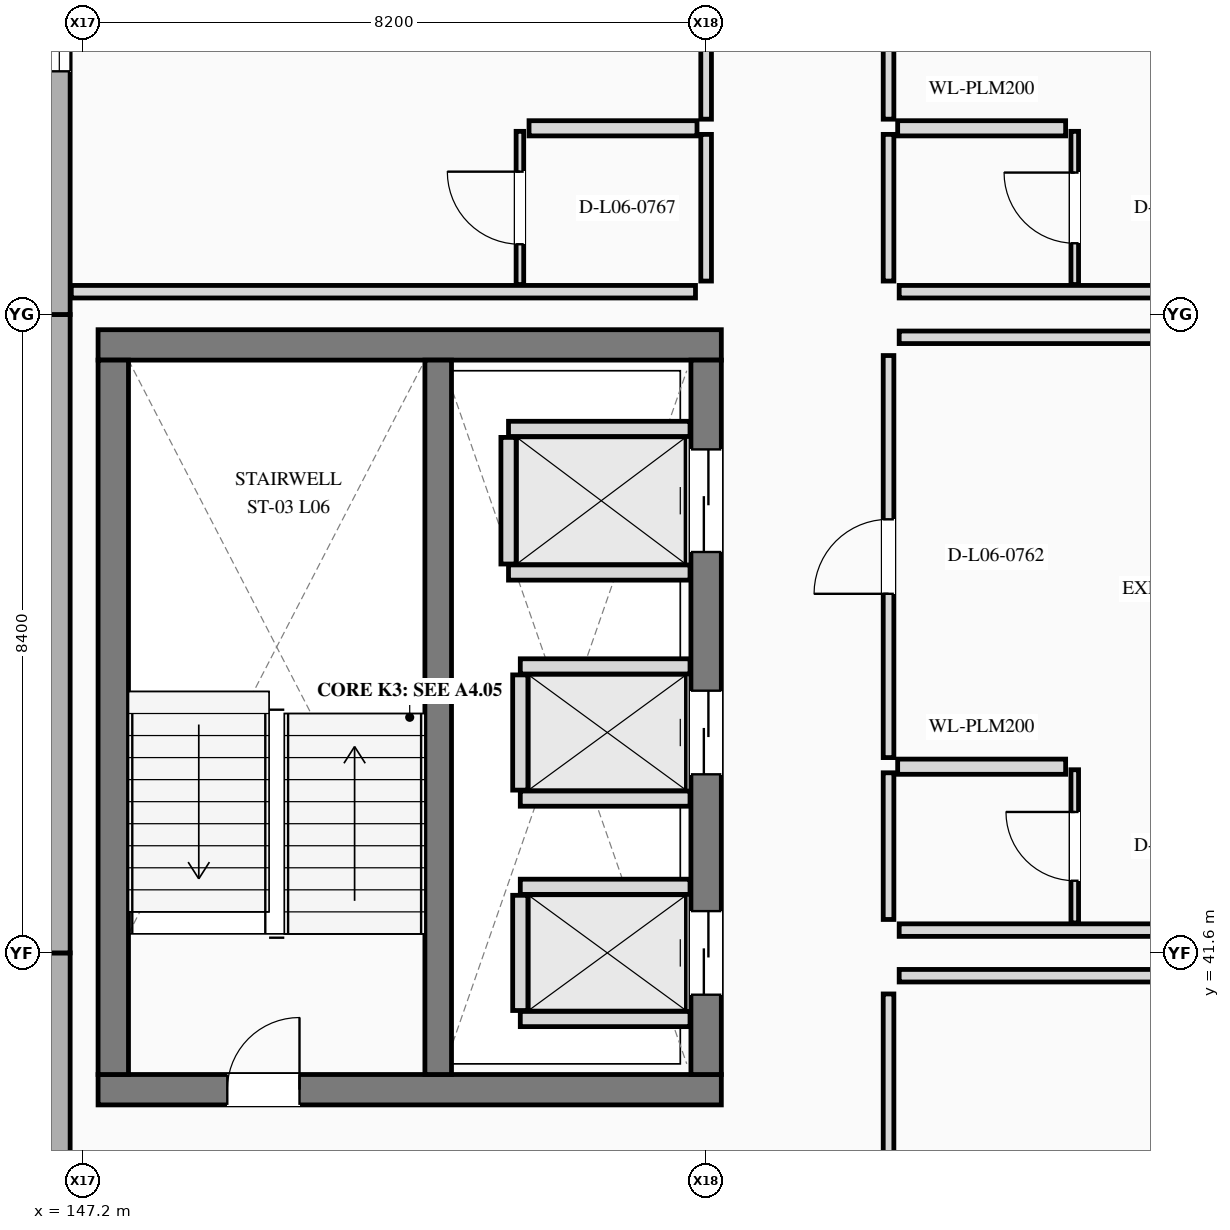
"""IFC4 building model, lengths in metres.
Left out: names, types, materials, properties, quantities, classifications, styles, units other than length and angle.
Written with IfcOpenShell. Run it as: python <this file> out.ifc"""

import sys

from ifc_helpers import new_model, si_unit, direction, frame, frame_2d, origin, place, context, subcontext, project, spatial, rectangle, extrude, element, fill, save


model = new_model("IFC4")
c1 = context("Model", 3, precision=1e-05, world=origin(), true_north=direction((0.0, 1.0)))
c2 = subcontext(c1, "Body", "Model", "MODEL_VIEW")
j1 = project(units=[si_unit("LENGTHUNIT", "METRE"), si_unit("PLANEANGLEUNIT", "RADIAN")], contexts=[c1])
p1 = place(None, origin())
s1 = spatial("IfcSite", under=j1, at=p1, CompositionType="ELEMENT")
p2 = place(p1, origin())
s2 = spatial("IfcBuilding", under=s1, at=p2, CompositionType="ELEMENT")
p3 = place(p2, frame((0.0, 0.0, 27.0)))
s3 = spatial("IfcBuildingStorey", under=s2, at=p3, CompositionType="ELEMENT", Elevation=27.0)
p4 = place(p3, frame((146.89, 33.2, 0.0), z_axis=(0.0, 0.0, 1.0), x_axis=(0.0, 1.0, 0.0)))
e1 = element("IfcWall", 1, at=p4, inside=s3, PredefinedType="STANDARD", context=c2, shape_type="SweptSolid", body=[
    extrude(rectangle(XDim=8.4, YDim=0.285, at=frame_2d((4.2, 0.0))), origin(), (0.0, 0.0, 1.0), 3.6),
])
p5 = place(p3, frame((146.89, 41.6, 0.0), z_axis=(0.0, 0.0, 1.0), x_axis=(0.0, 1.0, 0.0)))
e2 = element("IfcWall", 2, at=p5, inside=s3, PredefinedType="STANDARD", context=c2, shape_type="SweptSolid", body=[
    extrude(rectangle(XDim=8.4, YDim=0.285, at=frame_2d((4.2, 0.0))), origin(), (0.0, 0.0, 1.0), 3.6),
])
p6 = place(p3, frame((146.89, 50.0, 0.0), z_axis=(0.0, 0.0, 1.0), x_axis=(0.0, 1.0, 0.0)))
e3 = element("IfcWall", 3, at=p6, inside=s3, PredefinedType="STANDARD", context=c2, shape_type="SweptSolid", body=[
    extrude(rectangle(XDim=8.4, YDim=0.285, at=frame_2d((4.2, 0.0))), origin(), (0.0, 0.0, 1.0), 3.6),
])
p7 = place(p6, frame((3.2, 0.0, 0.85)))
e4 = element("IfcOpeningElement", 4, at=p7, cuts=e3, PredefinedType="OPENING", context=c2, shape_type="SweptSolid", body=[
    extrude(rectangle(XDim=2.0, YDim=1.65, at=frame_2d((1.0, 0.825))), frame((0.0, 0.152, 0.0), z_axis=(0.0, -1.0, 0.0), x_axis=(1.0, 0.0, 0.0)), (0.0, 0.0, 1.0), 0.305),
])
p8 = place(p3, frame((147.4, 39.8, 0.0), z_axis=(0.0, 0.0, 1.0), x_axis=(1.0, 0.0, 0.0)))
e5 = element("IfcWall", 5, at=p8, inside=s3, PredefinedType="SHEAR", context=c2, shape_type="SweptSolid", body=[
    extrude(rectangle(XDim=8.2, YDim=0.4, at=frame_2d((4.1, 0.0))), origin(), (0.0, 0.0, 1.0), 3.6),
])
p9 = place(p8, frame((1.7, 0.0, 0.0)))
e6 = element("IfcOpeningElement", 6, at=p9, cuts=e5, PredefinedType="OPENING", context=c2, shape_type="SweptSolid", body=[
    extrude(rectangle(XDim=0.95, YDim=2.2, at=frame_2d((0.475, 1.1))), frame((0.0, 0.21, 0.0), z_axis=(0.0, -1.0, 0.0), x_axis=(1.0, 0.0, 0.0)), (0.0, 0.0, 1.0), 0.42),
])
p10 = place(p3, frame((155.6, 49.6, 0.0), z_axis=(0.0, 0.0, 1.0), x_axis=(-1.0, 0.0, 0.0)))
e7 = element("IfcWall", 7, at=p10, inside=s3, PredefinedType="SHEAR", context=c2, shape_type="SweptSolid", body=[
    extrude(rectangle(XDim=8.2, YDim=0.4, at=frame_2d((4.1, 0.0))), origin(), (0.0, 0.0, 1.0), 3.6),
])
p11 = place(p3, frame((147.6, 49.4, 0.0), z_axis=(0.0, 0.0, 1.0), x_axis=(0.0, -1.0, 0.0)))
e8 = element("IfcWall", 8, at=p11, inside=s3, PredefinedType="SHEAR", context=c2, shape_type="SweptSolid", body=[
    extrude(rectangle(XDim=9.4, YDim=0.4, at=frame_2d((4.7, 0.0))), origin(), (0.0, 0.0, 1.0), 3.6),
])
p12 = place(p3, frame((155.4, 40.0, 0.0), z_axis=(0.0, 0.0, 1.0), x_axis=(0.0, 1.0, 0.0)))
e9 = element("IfcWall", 9, at=p12, inside=s3, PredefinedType="SHEAR", context=c2, shape_type="SweptSolid", body=[
    extrude(rectangle(XDim=9.4, YDim=0.4, at=frame_2d((4.7, 0.0))), origin(), (0.0, 0.0, 1.0), 3.6),
])
p13 = place(p12, frame((1.05, 0.0, 0.0)))
e10 = element("IfcOpeningElement", 10, at=p13, cuts=e9, PredefinedType="OPENING", context=c2, shape_type="SweptSolid", body=[
    extrude(rectangle(XDim=1.1, YDim=2.2, at=frame_2d((0.55, 1.1))), frame((0.0, 0.21, 0.0), z_axis=(0.0, -1.0, 0.0), x_axis=(1.0, 0.0, 0.0)), (0.0, 0.0, 1.0), 0.42),
])
p14 = place(p12, frame((3.95, 0.0, 0.0)))
e11 = element("IfcOpeningElement", 11, at=p14, cuts=e9, PredefinedType="OPENING", context=c2, shape_type="SweptSolid", body=[
    extrude(rectangle(XDim=1.1, YDim=2.2, at=frame_2d((0.55, 1.1))), frame((0.0, 0.21, 0.0), z_axis=(0.0, -1.0, 0.0), x_axis=(1.0, 0.0, 0.0)), (0.0, 0.0, 1.0), 0.42),
])
p15 = place(p12, frame((6.875, 0.0, 0.0)))
e12 = element("IfcOpeningElement", 12, at=p15, cuts=e9, PredefinedType="OPENING", context=c2, shape_type="SweptSolid", body=[
    extrude(rectangle(XDim=1.35, YDim=2.3, at=frame_2d((0.675, 1.15))), frame((0.0, 0.21, 0.0), z_axis=(0.0, -1.0, 0.0), x_axis=(1.0, 0.0, 0.0)), (0.0, 0.0, 1.0), 0.42),
])
p16 = place(p3, frame((151.875, 40.0, 0.0), z_axis=(0.0, 0.0, 1.0), x_axis=(0.0, 1.0, 0.0)))
e13 = element("IfcWall", 13, at=p16, inside=s3, PredefinedType="SHEAR", context=c2, shape_type="SweptSolid", body=[
    extrude(rectangle(XDim=9.4, YDim=0.35, at=frame_2d((4.7, 0.0))), origin(), (0.0, 0.0, 1.0), 3.6),
])
for number, where, z_axis, x_axis in (
    (14, (152.955, 40.73, 0.0), (0.0, 0.0, 1.0), (1.0, 0.0, 0.0)),
    (15, (152.955, 42.47, 0.0), (0.0, 0.0, 1.0), (1.0, 0.0, 0.0)),
):
    element("IfcWall", number, at=place(p3, frame(where, z_axis=z_axis, x_axis=x_axis)), inside=s3, PredefinedType="PLUMBINGWALL", context=c2, shape_type="SweptSolid", body=[
        extrude(rectangle(XDim=2.233, YDim=0.2, at=frame_2d((1.116, 0.0))), origin(), (0.0, 0.0, 1.0), 3.29),
    ])
p17 = place(p3, frame((152.955, 40.842, 0.0), z_axis=(0.0, 0.0, 1.0), x_axis=(0.0, 1.0, 0.0)))
e16 = element("IfcWall", 16, at=p17, inside=s3, PredefinedType="PLUMBINGWALL", context=c2, shape_type="SweptSolid", body=[
    extrude(rectangle(XDim=1.516, YDim=0.2, at=frame_2d((0.758, 0.0))), origin(), (0.0, 0.0, 1.0), 3.29),
])
for number, where, z_axis, x_axis in (
    (17, (152.955, 43.63, 0.0), (0.0, 0.0, 1.0), (1.0, 0.0, 0.0)),
    (18, (152.955, 45.37, 0.0), (0.0, 0.0, 1.0), (1.0, 0.0, 0.0)),
):
    element("IfcWall", number, at=place(p3, frame(where, z_axis=z_axis, x_axis=x_axis)), inside=s3, PredefinedType="PLUMBINGWALL", context=c2, shape_type="SweptSolid", body=[
        extrude(rectangle(XDim=2.233, YDim=0.2, at=frame_2d((1.116, 0.0))), origin(), (0.0, 0.0, 1.0), 3.29),
    ])
p18 = place(p3, frame((152.955, 43.742, 0.0), z_axis=(0.0, 0.0, 1.0), x_axis=(0.0, 1.0, 0.0)))
e19 = element("IfcWall", 19, at=p18, inside=s3, PredefinedType="PLUMBINGWALL", context=c2, shape_type="SweptSolid", body=[
    extrude(rectangle(XDim=1.516, YDim=0.2, at=frame_2d((0.758, 0.0))), origin(), (0.0, 0.0, 1.0), 3.29),
])
for number, where, z_axis, x_axis in (
    (20, (152.8, 46.605, 0.0), (0.0, 0.0, 1.0), (1.0, 0.0, 0.0)),
    (21, (152.8, 48.495, 0.0), (0.0, 0.0, 1.0), (1.0, 0.0, 0.0)),
):
    element("IfcWall", number, at=place(p3, frame(where, z_axis=z_axis, x_axis=x_axis)), inside=s3, PredefinedType="PLUMBINGWALL", context=c2, shape_type="SweptSolid", body=[
        extrude(rectangle(XDim=2.388, YDim=0.2, at=frame_2d((1.194, 0.0))), origin(), (0.0, 0.0, 1.0), 3.29),
    ])
p19 = place(p3, frame((152.8, 46.717, 0.0), z_axis=(0.0, 0.0, 1.0), x_axis=(0.0, 1.0, 0.0)))
e22 = element("IfcWall", 22, at=p19, inside=s3, PredefinedType="PLUMBINGWALL", context=c2, shape_type="SweptSolid", body=[
    extrude(rectangle(XDim=1.666, YDim=0.2, at=frame_2d((0.833, 0.0))), origin(), (0.0, 0.0, 1.0), 3.29),
])
p20 = place(p3, frame((157.8, 35.77, 0.0), z_axis=(0.0, 0.0, 1.0), x_axis=(0.0, 1.0, 0.0)))
e23 = element("IfcWall", 23, at=p20, inside=s3, PredefinedType="PARTITIONING", context=c2, shape_type="SweptSolid", body=[
    extrude(rectangle(XDim=5.29, YDim=0.14, at=frame_2d((2.645, 0.0))), origin(), (0.0, 0.0, 1.0), 2.843),
])
p21 = place(p20, frame((2.185, 0.0, 0.0)))
e24 = element("IfcOpeningElement", 24, at=p21, cuts=e23, PredefinedType="OPENING", context=c2, shape_type="SweptSolid", body=[
    extrude(rectangle(XDim=0.92, YDim=2.3, at=frame_2d((0.46, 1.15))), frame((0.0, 0.08, 0.0), z_axis=(0.0, -1.0, 0.0), x_axis=(1.0, 0.0, 0.0)), (0.0, 0.0, 1.0), 0.16),
])
p22 = place(p3, frame((157.94, 41.3, 0.0), z_axis=(0.0, 0.0, 1.0), x_axis=(1.0, 0.0, 0.0)))
e25 = element("IfcWall", 25, at=p22, inside=s3, PredefinedType="PARTITIONING", context=c2, shape_type="SweptSolid", body=[
    extrude(rectangle(XDim=8.213, YDim=0.165, at=frame_2d((4.106, 0.0))), origin(), (0.0, 0.0, 1.0), 2.68),
])
p23 = place(p3, frame((157.8, 42.04, 0.0), z_axis=(0.0, 0.0, 1.0), x_axis=(0.0, 1.0, 0.0)))
e26 = element("IfcWall", 26, at=p23, inside=s3, PredefinedType="PARTITIONING", context=c2, shape_type="SweptSolid", body=[
    extrude(rectangle(XDim=1.93, YDim=0.14, at=frame_2d((0.965, 0.0))), origin(), (0.0, 0.0, 1.0), 3.29),
])
p24 = place(p3, frame((157.8, 44.17, 0.0), z_axis=(0.0, 0.0, 1.0), x_axis=(0.0, 1.0, 0.0)))
e27 = element("IfcWall", 27, at=p24, inside=s3, PredefinedType="PARTITIONING", context=c2, shape_type="SweptSolid", body=[
    extrude(rectangle(XDim=5.29, YDim=0.14, at=frame_2d((2.645, 0.0))), origin(), (0.0, 0.0, 1.0), 3.29),
])
p25 = place(p24, frame((2.155, 0.0, 0.0)))
e28 = element("IfcOpeningElement", 28, at=p25, cuts=e27, PredefinedType="OPENING", context=c2, shape_type="SweptSolid", body=[
    extrude(rectangle(XDim=0.98, YDim=2.35, at=frame_2d((0.49, 1.175))), frame((0.0, 0.08, 0.0), z_axis=(0.0, -1.0, 0.0), x_axis=(1.0, 0.0, 0.0)), (0.0, 0.0, 1.0), 0.16),
])
for number, where, z_axis, x_axis in (
    (29, (157.94, 41.9, 0.0), (0.0, 0.0, 1.0), (1.0, 0.0, 0.0)),
    (30, (157.94, 49.7, 0.0), (0.0, 0.0, 1.0), (1.0, 0.0, 0.0)),
):
    element("IfcWall", number, at=place(p3, frame(where, z_axis=z_axis, x_axis=x_axis)), inside=s3, PredefinedType="PARTITIONING", context=c2, shape_type="SweptSolid", body=[
        extrude(rectangle(XDim=8.213, YDim=0.165, at=frame_2d((4.106, 0.0))), origin(), (0.0, 0.0, 1.0), 2.68),
    ])
p26 = place(p3, frame((157.92, 44.05, 0.0), z_axis=(0.0, 0.0, 1.0), x_axis=(1.0, 0.0, 0.0)))
e31 = element("IfcWall", 31, at=p26, inside=s3, PredefinedType="PLUMBINGWALL", context=c2, shape_type="SweptSolid", body=[
    extrude(rectangle(XDim=2.21, YDim=0.2, at=frame_2d((1.105, 0.0))), origin(), (0.0, 0.0, 1.0), 3.29),
])
p27 = place(p3, frame((160.25, 41.994, 0.0), z_axis=(0.0, 0.0, 1.0), x_axis=(0.0, 1.0, 0.0)))
e32 = element("IfcWall", 32, at=p27, inside=s3, PredefinedType="PARTITIONING", context=c2, shape_type="SweptSolid", body=[
    extrude(rectangle(XDim=2.016, YDim=0.1, at=frame_2d((1.008, 0.0))), origin(), (0.0, 0.0, 1.0), 3.29),
])
p28 = place(p27, frame((0.555, 0.0, 0.0)))
e33 = element("IfcOpeningElement", 33, at=p28, cuts=e32, PredefinedType="OPENING", context=c2, shape_type="SweptSolid", body=[
    extrude(rectangle(XDim=0.905, YDim=2.1, at=frame_2d((0.453, 1.05))), frame((0.0, 0.06, 0.0), z_axis=(0.0, -1.0, 0.0), x_axis=(1.0, 0.0, 0.0)), (0.0, 0.0, 1.0), 0.12),
])
p29 = place(p3, frame((157.8, 50.44, 0.0), z_axis=(0.0, 0.0, 1.0), x_axis=(0.0, 1.0, 0.0)))
e34 = element("IfcWall", 34, at=p29, inside=s3, PredefinedType="PARTITIONING", context=c2, shape_type="SweptSolid", body=[
    extrude(rectangle(XDim=1.93, YDim=0.14, at=frame_2d((0.965, 0.0))), origin(), (0.0, 0.0, 1.0), 2.843),
])
p30 = place(p3, frame((157.8, 52.57, 0.0), z_axis=(0.0, 0.0, 1.0), x_axis=(0.0, 1.0, 0.0)))
e35 = element("IfcWall", 35, at=p30, inside=s3, PredefinedType="PARTITIONING", context=c2, shape_type="SweptSolid", body=[
    extrude(rectangle(XDim=5.29, YDim=0.14, at=frame_2d((2.645, 0.0))), origin(), (0.0, 0.0, 1.0), 2.843),
])
p31 = place(p30, frame((2.14, 0.0, 0.0)))
e36 = element("IfcOpeningElement", 36, at=p31, cuts=e35, PredefinedType="OPENING", context=c2, shape_type="SweptSolid", body=[
    extrude(rectangle(XDim=1.01, YDim=2.35, at=frame_2d((0.505, 1.175))), frame((0.0, 0.08, 0.0), z_axis=(0.0, -1.0, 0.0), x_axis=(1.0, 0.0, 0.0)), (0.0, 0.0, 1.0), 0.16),
])
p32 = place(p3, frame((157.94, 50.3, 0.0), z_axis=(0.0, 0.0, 1.0), x_axis=(1.0, 0.0, 0.0)))
e37 = element("IfcWall", 37, at=p32, inside=s3, PredefinedType="PARTITIONING", context=c2, shape_type="SweptSolid", body=[
    extrude(rectangle(XDim=8.213, YDim=0.165, at=frame_2d((4.106, 0.0))), origin(), (0.0, 0.0, 1.0), 2.68),
])
p33 = place(p3, frame((157.92, 52.45, 0.0), z_axis=(0.0, 0.0, 1.0), x_axis=(1.0, 0.0, 0.0)))
e38 = element("IfcWall", 38, at=p33, inside=s3, PredefinedType="PLUMBINGWALL", context=c2, shape_type="SweptSolid", body=[
    extrude(rectangle(XDim=2.21, YDim=0.2, at=frame_2d((1.105, 0.0))), origin(), (0.0, 0.0, 1.0), 3.29),
])
p34 = place(p3, frame((160.25, 50.395, 0.0), z_axis=(0.0, 0.0, 1.0), x_axis=(0.0, 1.0, 0.0)))
e39 = element("IfcWall", 39, at=p34, inside=s3, PredefinedType="PARTITIONING", context=c2, shape_type="SweptSolid", body=[
    extrude(rectangle(XDim=2.015, YDim=0.1, at=frame_2d((1.008, 0.0))), origin(), (0.0, 0.0, 1.0), 2.843),
])
p35 = place(p34, frame((0.543, 0.0, 0.0)))
e40 = element("IfcOpeningElement", 40, at=p35, cuts=e39, PredefinedType="OPENING", context=c2, shape_type="SweptSolid", body=[
    extrude(rectangle(XDim=0.93, YDim=2.14, at=frame_2d((0.465, 1.07))), frame((0.0, 0.06, 0.0), z_axis=(0.0, -1.0, 0.0), x_axis=(1.0, 0.0, 0.0)), (0.0, 0.0, 1.0), 0.12),
])
p36 = place(p3, frame((155.4, 50.44, 0.0), z_axis=(0.0, 0.0, 1.0), x_axis=(0.0, 1.0, 0.0)))
e41 = element("IfcWall", 41, at=p36, inside=s3, PredefinedType="PARTITIONING", context=c2, shape_type="SweptSolid", body=[
    extrude(rectangle(XDim=1.93, YDim=0.14, at=frame_2d((0.965, 0.0))), origin(), (0.0, 0.0, 1.0), 2.68),
])
p37 = place(p3, frame((155.4, 52.57, 0.0), z_axis=(0.0, 0.0, 1.0), x_axis=(0.0, 1.0, 0.0)))
e42 = element("IfcWall", 42, at=p37, inside=s3, PredefinedType="PARTITIONING", context=c2, shape_type="SweptSolid", body=[
    extrude(rectangle(XDim=5.29, YDim=0.14, at=frame_2d((2.645, 0.0))), origin(), (0.0, 0.0, 1.0), 2.68),
])
p38 = place(p37, frame((2.125, 0.0, 0.0)))
e43 = element("IfcOpeningElement", 43, at=p38, cuts=e42, PredefinedType="OPENING", context=c2, shape_type="SweptSolid", body=[
    extrude(rectangle(XDim=1.04, YDim=2.4, at=frame_2d((0.52, 1.2))), frame((0.0, 0.08, 0.0), z_axis=(0.0, -1.0, 0.0), x_axis=(1.0, 0.0, 0.0)), (0.0, 0.0, 1.0), 0.16),
])
p39 = place(p3, frame((147.048, 50.3, 0.0), z_axis=(0.0, 0.0, 1.0), x_axis=(1.0, 0.0, 0.0)))
e44 = element("IfcWall", 44, at=p39, inside=s3, PredefinedType="PARTITIONING", context=c2, shape_type="SweptSolid", body=[
    extrude(rectangle(XDim=8.212, YDim=0.165, at=frame_2d((4.106, 0.0))), origin(), (0.0, 0.0, 1.0), 3.29),
])
p40 = place(p3, frame((153.07, 52.45, 0.0), z_axis=(0.0, 0.0, 1.0), x_axis=(1.0, 0.0, 0.0)))
e45 = element("IfcWall", 45, at=p40, inside=s3, PredefinedType="PLUMBINGWALL", context=c2, shape_type="SweptSolid", body=[
    extrude(rectangle(XDim=2.21, YDim=0.2, at=frame_2d((1.105, 0.0))), origin(), (0.0, 0.0, 1.0), 3.29),
])
p41 = place(p3, frame((152.95, 50.395, 0.0), z_axis=(0.0, 0.0, 1.0), x_axis=(0.0, 1.0, 0.0)))
e46 = element("IfcWall", 46, at=p41, inside=s3, PredefinedType="PARTITIONING", context=c2, shape_type="SweptSolid", body=[
    extrude(rectangle(XDim=2.015, YDim=0.1, at=frame_2d((1.008, 0.0))), origin(), (0.0, 0.0, 1.0), 3.29),
])
p42 = place(p41, frame((0.53, 0.0, 0.0)))
e47 = element("IfcOpeningElement", 47, at=p42, cuts=e46, PredefinedType="OPENING", context=c2, shape_type="SweptSolid", body=[
    extrude(rectangle(XDim=0.955, YDim=2.14, at=frame_2d((0.478, 1.07))), frame((0.0, 0.06, 0.0), z_axis=(0.0, -1.0, 0.0), x_axis=(1.0, 0.0, 0.0)), (0.0, 0.0, 1.0), 0.12),
])
p43 = place(p7, origin())
e48 = element("IfcWindow", 48, at=p43, inside=s3, PartitioningType="SINGLE_PANEL", PredefinedType="WINDOW", context=c2, shape_type="SweptSolid", body=[
    extrude(rectangle(XDim=2.0, YDim=1.65, at=frame_2d((1.0, 0.825))), frame((0.0, 0.03, 0.0), z_axis=(0.0, -1.0, 0.0), x_axis=(1.0, 0.0, 0.0)), (0.0, 0.0, 1.0), 0.06),
])
fill(e4, e48)
p44 = place(p9, origin())
e49 = element("IfcDoor", 49, at=p44, inside=s3, OperationType="SINGLE_SWING_RIGHT", PredefinedType="DOOR", context=c2, shape_type="SweptSolid", body=[
    extrude(rectangle(XDim=0.95, YDim=2.2, at=frame_2d((0.475, 1.1))), frame((0.0, 0.025, 0.0), z_axis=(0.0, -1.0, 0.0), x_axis=(1.0, 0.0, 0.0)), (0.0, 0.0, 1.0), 0.05),
])
fill(e6, e49)
p45 = place(p13, origin())
e50 = element("IfcDoor", 50, at=p45, inside=s3, OperationType="SLIDING_TO_LEFT", PredefinedType="DOOR", context=c2, shape_type="SweptSolid", body=[
    extrude(rectangle(XDim=1.1, YDim=2.2, at=frame_2d((0.55, 1.1))), frame((0.0, 0.025, 0.0), z_axis=(0.0, -1.0, 0.0), x_axis=(1.0, 0.0, 0.0)), (0.0, 0.0, 1.0), 0.05),
])
fill(e10, e50)
p46 = place(p14, origin())
e51 = element("IfcDoor", 51, at=p46, inside=s3, OperationType="SLIDING_TO_RIGHT", PredefinedType="DOOR", context=c2, shape_type="SweptSolid", body=[
    extrude(rectangle(XDim=1.1, YDim=2.2, at=frame_2d((0.55, 1.1))), frame((0.0, 0.025, 0.0), z_axis=(0.0, -1.0, 0.0), x_axis=(1.0, 0.0, 0.0)), (0.0, 0.0, 1.0), 0.05),
])
fill(e11, e51)
p47 = place(p15, origin())
e52 = element("IfcDoor", 52, at=p47, inside=s3, OperationType="SLIDING_TO_LEFT", PredefinedType="DOOR", context=c2, shape_type="SweptSolid", body=[
    extrude(rectangle(XDim=1.35, YDim=2.3, at=frame_2d((0.675, 1.15))), frame((0.0, 0.025, 0.0), z_axis=(0.0, -1.0, 0.0), x_axis=(1.0, 0.0, 0.0)), (0.0, 0.0, 1.0), 0.05),
])
fill(e12, e52)
p48 = place(p25, origin())
e53 = element("IfcDoor", 53, at=p48, inside=s3, OperationType="SINGLE_SWING_LEFT", PredefinedType="DOOR", context=c2, shape_type="SweptSolid", body=[
    extrude(rectangle(XDim=0.98, YDim=2.35, at=frame_2d((0.49, 1.175))), frame((0.0, 0.025, 0.0), z_axis=(0.0, -1.0, 0.0), x_axis=(1.0, 0.0, 0.0)), (0.0, 0.0, 1.0), 0.05),
])
fill(e28, e53)
p49 = place(p28, origin())
e54 = element("IfcDoor", 54, at=p49, inside=s3, OperationType="SINGLE_SWING_RIGHT", PredefinedType="DOOR", context=c2, shape_type="SweptSolid", body=[
    extrude(rectangle(XDim=0.905, YDim=2.1, at=frame_2d((0.453, 1.05))), frame((0.0, 0.025, 0.0), z_axis=(0.0, -1.0, 0.0), x_axis=(1.0, 0.0, 0.0)), (0.0, 0.0, 1.0), 0.05),
])
fill(e33, e54)
p50 = place(p35, origin())
e55 = element("IfcDoor", 55, at=p50, inside=s3, OperationType="SINGLE_SWING_RIGHT", PredefinedType="DOOR", context=c2, shape_type="SweptSolid", body=[
    extrude(rectangle(XDim=0.93, YDim=2.14, at=frame_2d((0.465, 1.07))), frame((0.0, 0.025, 0.0), z_axis=(0.0, -1.0, 0.0), x_axis=(1.0, 0.0, 0.0)), (0.0, 0.0, 1.0), 0.05),
])
fill(e40, e55)
p51 = place(p42, origin())
e56 = element("IfcDoor", 56, at=p51, inside=s3, OperationType="SINGLE_SWING_RIGHT", PredefinedType="DOOR", context=c2, shape_type="SweptSolid", body=[
    extrude(rectangle(XDim=0.955, YDim=2.14, at=frame_2d((0.478, 1.07))), frame((0.0, 0.025, 0.0), z_axis=(0.0, -1.0, 0.0), x_axis=(1.0, 0.0, 0.0)), (0.0, 0.0, 1.0), 0.05),
])
fill(e47, e56)
save(model, sys.argv[1])
